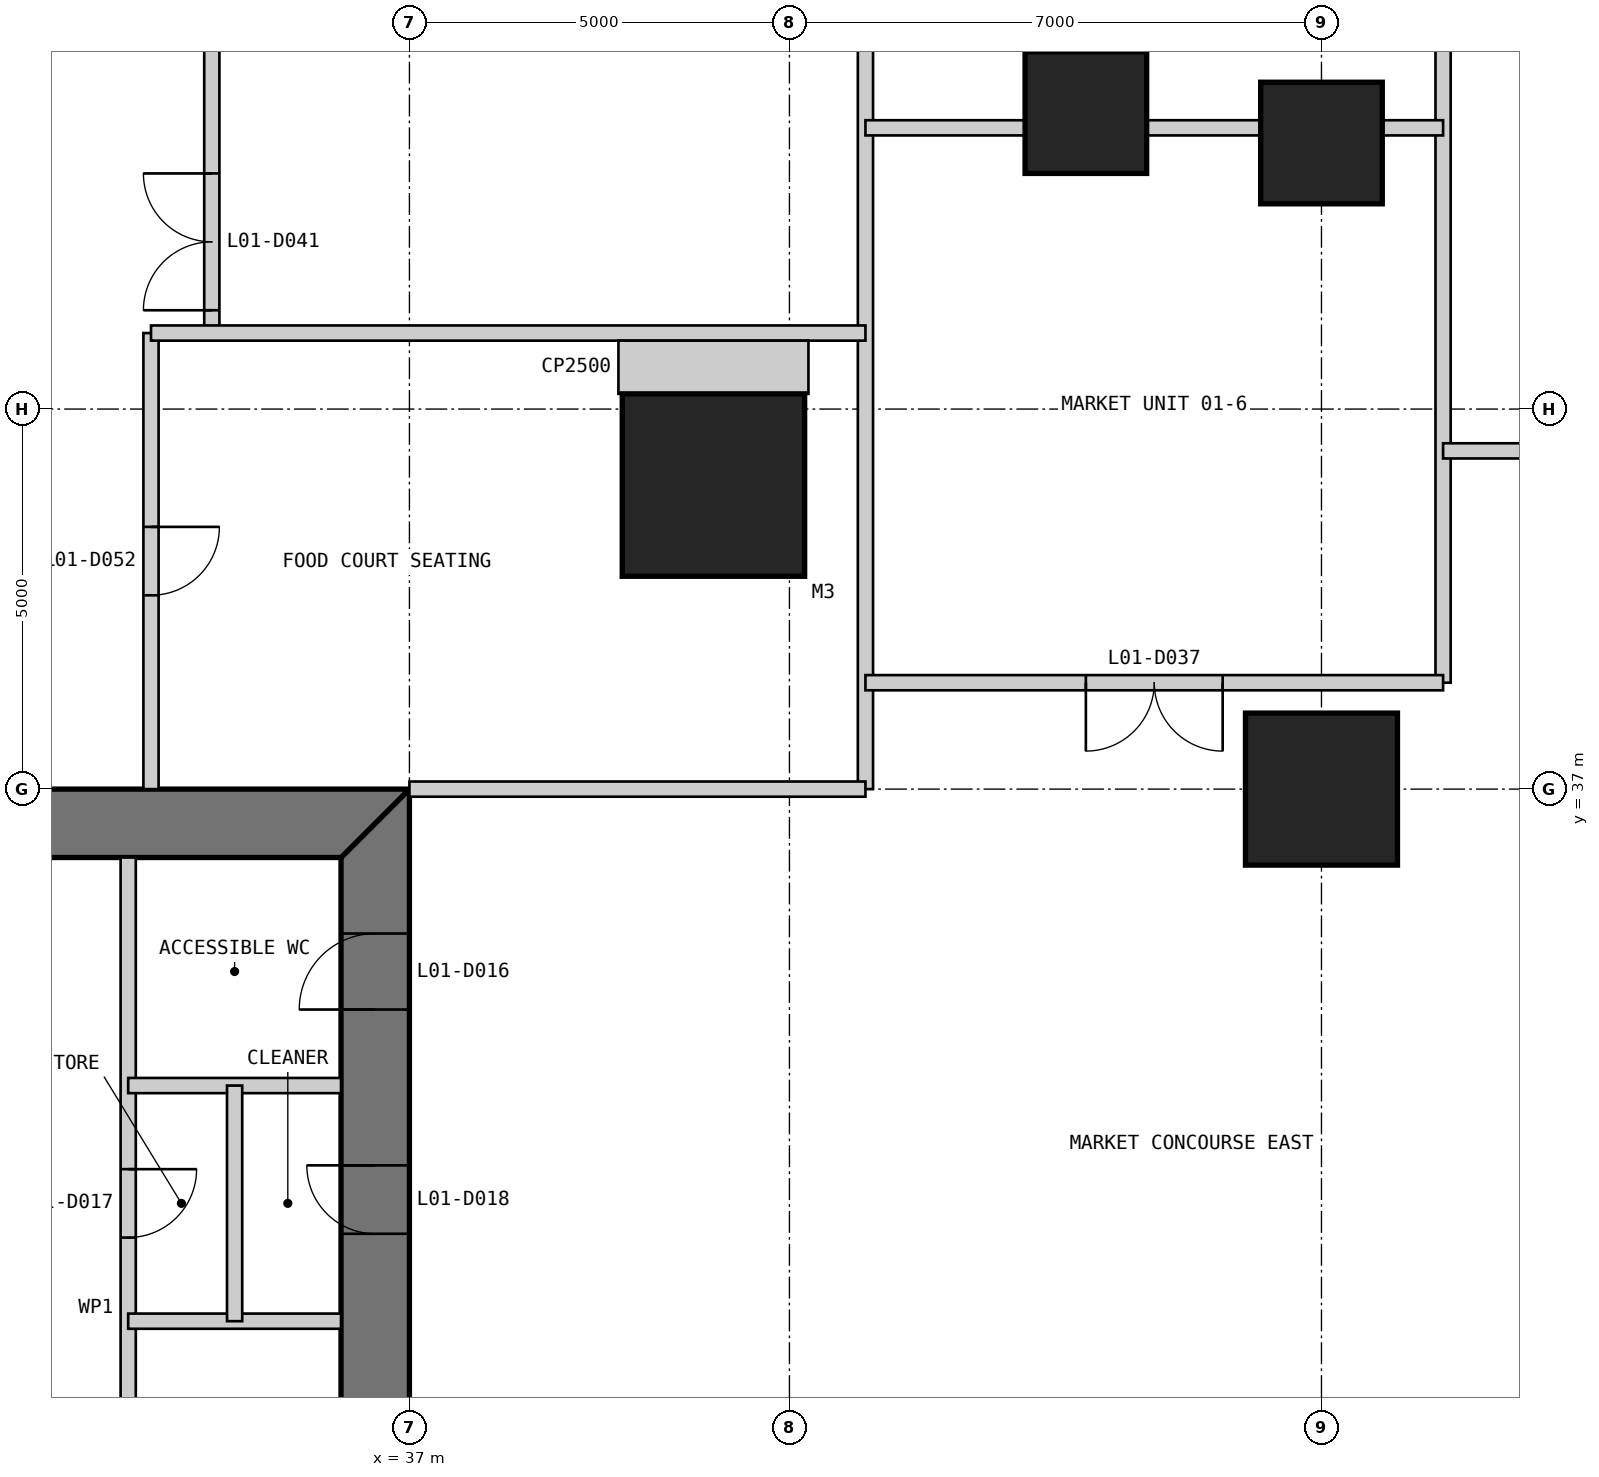
"""IFC4 building model, lengths in metres.
Left out: names, types, materials, properties, quantities, classifications, styles, units other than length and angle.
Written with IfcOpenShell. Run it as: python <this file> out.ifc"""

import sys

from ifc_helpers import new_model, si_unit, direction, frame, frame_2d, origin, origin_2d, place, context, subcontext, project, spatial, polyline, rectangle, outline, extrude, element, fill, save


model = new_model("IFC4")
c1 = context("Model", 3, precision=1e-05, world=origin(), true_north=direction((0.0, 1.0)))
c2 = subcontext(c1, "Body", "Model", "MODEL_VIEW")
j1 = project(units=[si_unit("LENGTHUNIT", "METRE"), si_unit("PLANEANGLEUNIT", "RADIAN")], contexts=[c1])
p1 = place(None, origin())
s1 = spatial("IfcSite", under=j1, at=p1, CompositionType="ELEMENT")
p2 = place(p1, origin())
s2 = spatial("IfcBuilding", under=s1, at=p2, CompositionType="ELEMENT")
p3 = place(p2, frame((0.0, 0.0, 7.0)))
s3 = spatial("IfcBuildingStorey", under=s2, at=p3, CompositionType="ELEMENT", Elevation=7.0)
p4 = place(p3, frame((41.0, 41.0, 0.0), z_axis=(0.0, 0.0, 1.0), x_axis=(1.0, 0.0, 0.0)))
e1 = element("IfcColumn", 1, at=p4, inside=s3, PredefinedType="COLUMN", context=c2, shape_type="SweptSolid", body=[
    extrude(rectangle(XDim=2.4, YDim=2.4, at=origin_2d()), origin(), (0.0, 0.0, 1.0), 4.8),
])
p5 = place(p3, frame((49.0, 37.0, 0.0), z_axis=(0.0, 0.0, 1.0), x_axis=(1.0, 0.0, 0.0)))
e2 = element("IfcColumn", 2, at=p5, inside=s3, PredefinedType="COLUMN", context=c2, shape_type="SweptSolid", body=[
    extrude(rectangle(XDim=2.0, YDim=2.0, at=origin_2d()), origin(), (0.0, 0.0, 1.0), 4.8),
])
for number, where, z_axis, x_axis in (
    (3, (49.0, 45.5, 0.0), (0.0, 0.0, 1.0), (1.0, 0.0, 0.0)),
    (4, (45.9, 45.9, 0.0), (0.0, 0.0, 1.0), (1.0, 0.0, 0.0)),
):
    element("IfcColumn", number, at=place(p3, frame(where, z_axis=z_axis, x_axis=x_axis)), inside=s3, PredefinedType="COLUMN", context=c2, shape_type="SweptSolid", body=[
        extrude(rectangle(XDim=1.6, YDim=1.6, at=origin_2d()), origin(), (0.0, 0.0, 1.0), 4.8),
    ])
p6 = place(p3, frame((36.55, 13.9, 0.0), z_axis=(0.0, 0.0, 1.0), x_axis=(0.0, 1.0, 0.0)))
e5 = element("IfcWall", 5, at=p6, inside=s3, PredefinedType="SHEAR", context=c2, shape_type="SweptSolid", body=[
    extrude(outline(polyline([(-0.9, -0.45), (23.1, -0.45), (22.2, 0.45), (0.0, 0.45), (-0.9, -0.45)])), origin(), (0.0, 0.0, 1.0), 4.8),
])
p7 = place(p6, frame((20.2, 0.0, 0.0)))
e6 = element("IfcOpeningElement", 6, at=p7, cuts=e5, PredefinedType="OPENING", context=c2, shape_type="SweptSolid", body=[
    extrude(rectangle(XDim=1.0, YDim=2.2, at=frame_2d((0.5, 1.1))), frame((0.0, 0.46, 0.0), z_axis=(0.0, -1.0, 0.0), x_axis=(1.0, 0.0, 0.0)), (0.0, 0.0, 1.0), 0.92),
])
p8 = place(p6, frame((17.25, 0.0, 0.0)))
e7 = element("IfcOpeningElement", 7, at=p8, cuts=e5, PredefinedType="OPENING", context=c2, shape_type="SweptSolid", body=[
    extrude(rectangle(XDim=0.9, YDim=2.2, at=frame_2d((0.45, 1.1))), frame((0.0, 0.46, 0.0), z_axis=(0.0, -1.0, 0.0), x_axis=(1.0, 0.0, 0.0)), (0.0, 0.0, 1.0), 0.92),
])
p9 = place(p3, frame((37.0, 36.55, 0.0), z_axis=(0.0, 0.0, 1.0), x_axis=(-1.0, 0.0, 0.0)))
e8 = element("IfcWall", 8, at=p9, inside=s3, PredefinedType="SHEAR", context=c2, shape_type="SweptSolid", body=[
    extrude(outline(polyline([(0.0, -0.45), (24.0, -0.45), (23.1, 0.45), (0.9, 0.45), (0.0, -0.45)])), origin(), (0.0, 0.0, 1.0), 4.8),
])
p10 = place(p9, frame((4.9, 0.0, 0.0)))
e9 = element("IfcOpeningElement", 9, at=p10, cuts=e8, PredefinedType="OPENING", context=c2, shape_type="SweptSolid", body=[
    extrude(rectangle(XDim=1.0, YDim=2.2, at=frame_2d((0.5, 1.1))), frame((0.0, 0.46, 0.0), z_axis=(0.0, -1.0, 0.0), x_axis=(1.0, 0.0, 0.0)), (0.0, 0.0, 1.0), 0.92),
])
p11 = place(p9, frame((8.9, 0.0, 0.0)))
e10 = element("IfcOpeningElement", 10, at=p11, cuts=e8, PredefinedType="OPENING", context=c2, shape_type="SweptSolid", body=[
    extrude(rectangle(XDim=1.1, YDim=2.2, at=frame_2d((0.55, 1.1))), frame((0.0, 0.46, 0.0), z_axis=(0.0, -1.0, 0.0), x_axis=(1.0, 0.0, 0.0)), (0.0, 0.0, 1.0), 0.92),
])
p12 = place(p9, frame((15.05, 0.0, 0.0)))
e11 = element("IfcOpeningElement", 11, at=p12, cuts=e8, PredefinedType="OPENING", context=c2, shape_type="SweptSolid", body=[
    extrude(rectangle(XDim=0.9, YDim=2.2, at=frame_2d((0.45, 1.1))), frame((0.0, 0.46, 0.0), z_axis=(0.0, -1.0, 0.0), x_axis=(1.0, 0.0, 0.0)), (0.0, 0.0, 1.0), 0.92),
])
p13 = place(p9, frame((17.9, 0.0, 0.0)))
e12 = element("IfcOpeningElement", 12, at=p13, cuts=e8, PredefinedType="OPENING", context=c2, shape_type="SweptSolid", body=[
    extrude(rectangle(XDim=1.0, YDim=2.2, at=frame_2d((0.5, 1.1))), frame((0.0, 0.46, 0.0), z_axis=(0.0, -1.0, 0.0), x_axis=(1.0, 0.0, 0.0)), (0.0, 0.0, 1.0), 0.92),
])
p14 = place(p9, frame((21.4, 0.0, 0.0)))
e13 = element("IfcOpeningElement", 13, at=p14, cuts=e8, PredefinedType="OPENING", context=c2, shape_type="SweptSolid", body=[
    extrude(rectangle(XDim=1.0, YDim=2.2, at=frame_2d((0.5, 1.1))), frame((0.0, 0.46, 0.0), z_axis=(0.0, -1.0, 0.0), x_axis=(1.0, 0.0, 0.0)), (0.0, 0.0, 1.0), 0.92),
])
p15 = place(p3, frame((33.3, 36.1, 0.0), z_axis=(0.0, 0.0, 1.0), x_axis=(0.0, -1.0, 0.0)))
e14 = element("IfcWall", 14, at=p15, inside=s3, PredefinedType="PARTITIONING", context=c2, shape_type="SweptSolid", body=[
    extrude(rectangle(XDim=16.1, YDim=0.2, at=frame_2d((8.05, 0.0))), origin(), (0.0, 0.0, 1.0), 4.6),
])
p16 = place(p15, frame((4.1, 0.0, 0.0)))
e15 = element("IfcOpeningElement", 15, at=p16, cuts=e14, PredefinedType="OPENING", context=c2, shape_type="SweptSolid", body=[
    extrude(rectangle(XDim=0.9, YDim=2.2, at=frame_2d((0.45, 1.1))), frame((0.0, 0.11, 0.0), z_axis=(0.0, -1.0, 0.0), x_axis=(1.0, 0.0, 0.0)), (0.0, 0.0, 1.0), 0.22),
])
for number, where, z_axis, x_axis in (
    (16, (36.1, 30.0, 0.0), (0.0, 0.0, 1.0), (-1.0, 0.0, 0.0)),
    (17, (36.1, 33.1, 0.0), (0.0, 0.0, 1.0), (-1.0, 0.0, 0.0)),
):
    element("IfcWall", number, at=place(p3, frame(where, z_axis=z_axis, x_axis=x_axis)), inside=s3, PredefinedType="PARTITIONING", context=c2, shape_type="SweptSolid", body=[
        extrude(rectangle(XDim=2.8, YDim=0.2, at=frame_2d((1.4, 0.0))), origin(), (0.0, 0.0, 1.0), 4.6),
    ])
p17 = place(p3, frame((34.7, 33.1, 0.0), z_axis=(0.0, 0.0, 1.0), x_axis=(0.0, -1.0, 0.0)))
e18 = element("IfcWall", 18, at=p17, inside=s3, PredefinedType="PARTITIONING", context=c2, shape_type="SweptSolid", body=[
    extrude(rectangle(XDim=3.1, YDim=0.2, at=frame_2d((1.55, 0.0))), origin(), (0.0, 0.0, 1.0), 4.6),
])
p18 = place(p3, frame((33.6, 37.0, 0.0), z_axis=(0.0, 0.0, 1.0), x_axis=(0.0, 1.0, 0.0)))
e19 = element("IfcWall", 19, at=p18, inside=s3, PredefinedType="PARTITIONING", context=c2, shape_type="SweptSolid", body=[
    extrude(rectangle(XDim=6.0, YDim=0.2, at=frame_2d((3.0, 0.0))), origin(), (0.0, 0.0, 1.0), 4.5),
])
p19 = place(p18, frame((2.55, 0.0, 0.0)))
e20 = element("IfcOpeningElement", 20, at=p19, cuts=e19, PredefinedType="OPENING", context=c2, shape_type="SweptSolid", body=[
    extrude(rectangle(XDim=0.9, YDim=2.2, at=frame_2d((0.45, 1.1))), frame((0.0, 0.11, 0.0), z_axis=(0.0, -1.0, 0.0), x_axis=(1.0, 0.0, 0.0)), (0.0, 0.0, 1.0), 0.22),
])
p20 = place(p3, frame((34.4, 43.0, 0.0), z_axis=(0.0, 0.0, 1.0), x_axis=(0.0, 1.0, 0.0)))
e21 = element("IfcWall", 21, at=p20, inside=s3, PredefinedType="PARTITIONING", context=c2, shape_type="SweptSolid", body=[
    extrude(rectangle(XDim=22.25, YDim=0.2, at=frame_2d((11.125, 0.0))), origin(), (0.0, 0.0, 1.0), 4.5),
])
p21 = place(p20, frame((6.425, 0.0, 0.0)))
e22 = element("IfcOpeningElement", 22, at=p21, cuts=e21, PredefinedType="OPENING", context=c2, shape_type="SweptSolid", body=[
    extrude(rectangle(XDim=1.8, YDim=2.4, at=frame_2d((0.9, 1.2))), frame((0.0, 0.11, 0.0), z_axis=(0.0, -1.0, 0.0), x_axis=(1.0, 0.0, 0.0)), (0.0, 0.0, 1.0), 0.22),
])
p22 = place(p20, frame((0.3, 0.0, 0.0)))
e23 = element("IfcOpeningElement", 23, at=p22, cuts=e21, PredefinedType="OPENING", context=c2, shape_type="SweptSolid", body=[
    extrude(rectangle(XDim=1.8, YDim=2.4, at=frame_2d((0.9, 1.2))), frame((0.0, 0.11, 0.0), z_axis=(0.0, -1.0, 0.0), x_axis=(1.0, 0.0, 0.0)), (0.0, 0.0, 1.0), 0.22),
])
p23 = place(p20, frame((17.5, 0.0, 0.0)))
e24 = element("IfcOpeningElement", 24, at=p23, cuts=e21, PredefinedType="OPENING", context=c2, shape_type="SweptSolid", body=[
    extrude(rectangle(XDim=1.8, YDim=2.4, at=frame_2d((0.9, 1.2))), frame((0.0, 0.11, 0.0), z_axis=(0.0, -1.0, 0.0), x_axis=(1.0, 0.0, 0.0)), (0.0, 0.0, 1.0), 0.22),
])
p24 = place(p3, frame((43.0, 37.0, 0.0), z_axis=(0.0, 0.0, 1.0), x_axis=(0.0, 1.0, 0.0)))
e25 = element("IfcWall", 25, at=p24, inside=s3, PredefinedType="PARTITIONING", context=c2, shape_type="SweptSolid", body=[
    extrude(rectangle(XDim=20.6, YDim=0.2, at=frame_2d((10.3, 0.0))), origin(), (0.0, 0.0, 1.0), 4.5),
])
p25 = place(p3, frame((50.6, 38.4, 0.0), z_axis=(0.0, 0.0, 1.0), x_axis=(0.0, 1.0, 0.0)))
e26 = element("IfcWall", 26, at=p25, inside=s3, PredefinedType="PARTITIONING", context=c2, shape_type="SweptSolid", body=[
    extrude(rectangle(XDim=26.85, YDim=0.2, at=frame_2d((13.425, 0.0))), origin(), (0.0, 0.0, 1.0), 4.5),
])
p26 = place(p3, frame((37.0, 37.0, 0.0), z_axis=(0.0, 0.0, 1.0), x_axis=(1.0, 0.0, 0.0)))
e27 = element("IfcWall", 27, at=p26, inside=s3, PredefinedType="PARTITIONING", context=c2, shape_type="SweptSolid", body=[
    extrude(rectangle(XDim=6.0, YDim=0.2, at=frame_2d((3.0, 0.0))), origin(), (0.0, 0.0, 1.0), 3.653),
])
p27 = place(p3, frame((43.0, 38.4, 0.0), z_axis=(0.0, 0.0, 1.0), x_axis=(1.0, 0.0, 0.0)))
e28 = element("IfcWall", 28, at=p27, inside=s3, PredefinedType="PARTITIONING", context=c2, shape_type="SweptSolid", body=[
    extrude(rectangle(XDim=7.6, YDim=0.2, at=frame_2d((3.8, 0.0))), origin(), (0.0, 0.0, 1.0), 4.5),
])
p28 = place(p27, frame((2.9, 0.0, 0.0)))
e29 = element("IfcOpeningElement", 29, at=p28, cuts=e28, PredefinedType="OPENING", context=c2, shape_type="SweptSolid", body=[
    extrude(rectangle(XDim=1.8, YDim=2.4, at=frame_2d((0.9, 1.2))), frame((0.0, 0.11, 0.0), z_axis=(0.0, -1.0, 0.0), x_axis=(1.0, 0.0, 0.0)), (0.0, 0.0, 1.0), 0.22),
])
p29 = place(p3, frame((50.6, 41.45, 0.0), z_axis=(0.0, 0.0, 1.0), x_axis=(1.0, 0.0, 0.0)))
e30 = element("IfcWall", 30, at=p29, inside=s3, PredefinedType="PARTITIONING", context=c2, shape_type="SweptSolid", body=[
    extrude(rectangle(XDim=14.65, YDim=0.2, at=frame_2d((7.325, 0.0))), origin(), (0.0, 0.0, 1.0), 4.5),
])
p30 = place(p29, frame((2.55, 0.0, 0.0)))
e31 = element("IfcOpeningElement", 31, at=p30, cuts=e30, PredefinedType="OPENING", context=c2, shape_type="SweptSolid", body=[
    extrude(rectangle(XDim=1.8, YDim=2.4, at=frame_2d((0.9, 1.2))), frame((0.0, 0.11, 0.0), z_axis=(0.0, -1.0, 0.0), x_axis=(1.0, 0.0, 0.0)), (0.0, 0.0, 1.0), 0.22),
])
p31 = place(p29, frame((9.825, 0.0, 0.0)))
e32 = element("IfcOpeningElement", 32, at=p31, cuts=e30, PredefinedType="OPENING", context=c2, shape_type="SweptSolid", body=[
    extrude(rectangle(XDim=1.8, YDim=2.4, at=frame_2d((0.9, 1.2))), frame((0.0, 0.11, 0.0), z_axis=(0.0, -1.0, 0.0), x_axis=(1.0, 0.0, 0.0)), (0.0, 0.0, 1.0), 0.22),
])
p32 = place(p3, frame((33.6, 43.0, 0.0), z_axis=(0.0, 0.0, 1.0), x_axis=(1.0, 0.0, 0.0)))
e33 = element("IfcWall", 33, at=p32, inside=s3, PredefinedType="PARTITIONING", context=c2, shape_type="SweptSolid", body=[
    extrude(rectangle(XDim=9.4, YDim=0.2, at=frame_2d((4.7, 0.0))), origin(), (0.0, 0.0, 1.0), 4.5),
])
p33 = place(p3, frame((43.0, 45.7, 0.0), z_axis=(0.0, 0.0, 1.0), x_axis=(1.0, 0.0, 0.0)))
e34 = element("IfcWall", 34, at=p33, inside=s3, PredefinedType="PARTITIONING", context=c2, shape_type="SweptSolid", body=[
    extrude(rectangle(XDim=2.1, YDim=0.2, at=frame_2d((1.05, 0.0))), origin(), (0.0, 0.0, 1.0), 4.5),
])
p34 = place(p3, frame((46.7, 45.7, 0.0), z_axis=(0.0, 0.0, 1.0), x_axis=(1.0, 0.0, 0.0)))
e35 = element("IfcWall", 35, at=p34, inside=s3, PredefinedType="PARTITIONING", context=c2, shape_type="SweptSolid", body=[
    extrude(rectangle(XDim=1.5, YDim=0.2, at=frame_2d((0.75, 0.0))), origin(), (0.0, 0.0, 1.0), 3.65),
])
p35 = place(p3, frame((49.8, 45.7, 0.0), z_axis=(0.0, 0.0, 1.0), x_axis=(1.0, 0.0, 0.0)))
e36 = element("IfcWall", 36, at=p35, inside=s3, PredefinedType="PARTITIONING", context=c2, shape_type="SweptSolid", body=[
    extrude(rectangle(XDim=0.8, YDim=0.2, at=frame_2d((0.4, 0.0))), origin(), (0.0, 0.0, 1.0), 4.5),
])
p36 = place(p3, frame((41.0, 42.9, 0.0), z_axis=(0.0, 0.0, 1.0), x_axis=(0.0, -1.0, 0.0)))
e37 = element("IfcWall", 37, at=p36, inside=s3, PredefinedType="PARTITIONING", context=c2, shape_type="SweptSolid", body=[
    extrude(rectangle(XDim=0.7, YDim=2.5, at=frame_2d((0.35, 0.0))), origin(), (0.0, 0.0, 1.0), 4.5),
])
p37 = place(p7, origin())
e38 = element("IfcDoor", 38, at=p37, inside=s3, OperationType="SINGLE_SWING_LEFT", PredefinedType="DOOR", context=c2, shape_type="SweptSolid", body=[
    extrude(rectangle(XDim=1.0, YDim=2.2, at=frame_2d((0.5, 1.1))), frame((0.0, 0.025, 0.0), z_axis=(0.0, -1.0, 0.0), x_axis=(1.0, 0.0, 0.0)), (0.0, 0.0, 1.0), 0.05),
    extrude(outline(polyline([(0.0, 0.0), (0.04, 0.0), (0.04, 2.16), (0.96, 2.16), (0.96, 0.0), (1.0, 0.0), (1.0, 2.2), (0.0, 2.2), (0.0, 0.0)])), frame((0.0, 0.3, 0.0), z_axis=(0.0, -1.0, 0.0), x_axis=(1.0, 0.0, 0.0)), (0.0, 0.0, 1.0), 0.6),
])
fill(e6, e38)
p38 = place(p16, origin())
e39 = element("IfcDoor", 39, at=p38, inside=s3, OperationType="SINGLE_SWING_LEFT", PredefinedType="DOOR", context=c2, shape_type="SweptSolid", body=[
    extrude(rectangle(XDim=0.9, YDim=2.2, at=frame_2d((0.45, 1.1))), frame((0.0, 0.025, 0.0), z_axis=(0.0, -1.0, 0.0), x_axis=(1.0, 0.0, 0.0)), (0.0, 0.0, 1.0), 0.05),
])
fill(e15, e39)
p39 = place(p8, origin())
e40 = element("IfcDoor", 40, at=p39, inside=s3, OperationType="SINGLE_SWING_RIGHT", PredefinedType="DOOR", context=c2, shape_type="SweptSolid", body=[
    extrude(rectangle(XDim=0.9, YDim=2.2, at=frame_2d((0.45, 1.1))), frame((0.0, 0.025, 0.0), z_axis=(0.0, -1.0, 0.0), x_axis=(1.0, 0.0, 0.0)), (0.0, 0.0, 1.0), 0.05),
    extrude(outline(polyline([(0.0, 0.0), (0.04, 0.0), (0.04, 2.16), (0.86, 2.16), (0.86, 0.0), (0.9, 0.0), (0.9, 2.2), (0.0, 2.2), (0.0, 0.0)])), frame((0.0, 0.3, 0.0), z_axis=(0.0, -1.0, 0.0), x_axis=(1.0, 0.0, 0.0)), (0.0, 0.0, 1.0), 0.6),
])
fill(e7, e40)
p40 = place(p28, frame((1.8, 0.0, 0.0), z_axis=(0.0, 0.0, 1.0), x_axis=(-1.0, 0.0, 0.0)))
e41 = element("IfcDoor", 41, at=p40, inside=s3, OperationType="DOUBLE_DOOR_SINGLE_SWING", PredefinedType="DOOR", context=c2, shape_type="SweptSolid", body=[
    extrude(rectangle(XDim=1.8, YDim=2.4, at=frame_2d((0.9, 1.2))), frame((0.0, 0.025, 0.0), z_axis=(0.0, -1.0, 0.0), x_axis=(1.0, 0.0, 0.0)), (0.0, 0.0, 1.0), 0.05),
])
fill(e29, e41)
p41 = place(p22, origin())
e42 = element("IfcDoor", 42, at=p41, inside=s3, OperationType="DOUBLE_DOOR_SINGLE_SWING", PredefinedType="DOOR", context=c2, shape_type="SweptSolid", body=[
    extrude(rectangle(XDim=1.8, YDim=2.4, at=frame_2d((0.9, 1.2))), frame((0.0, 0.025, 0.0), z_axis=(0.0, -1.0, 0.0), x_axis=(1.0, 0.0, 0.0)), (0.0, 0.0, 1.0), 0.05),
])
fill(e23, e42)
p42 = place(p19, frame((0.9, 0.0, 0.0), z_axis=(0.0, 0.0, 1.0), x_axis=(-1.0, 0.0, 0.0)))
e43 = element("IfcDoor", 43, at=p42, inside=s3, OperationType="SINGLE_SWING_LEFT", PredefinedType="DOOR", context=c2, shape_type="SweptSolid", body=[
    extrude(rectangle(XDim=0.9, YDim=2.2, at=frame_2d((0.45, 1.1))), frame((0.0, 0.025, 0.0), z_axis=(0.0, -1.0, 0.0), x_axis=(1.0, 0.0, 0.0)), (0.0, 0.0, 1.0), 0.05),
])
fill(e20, e43)
save(model, sys.argv[1])
